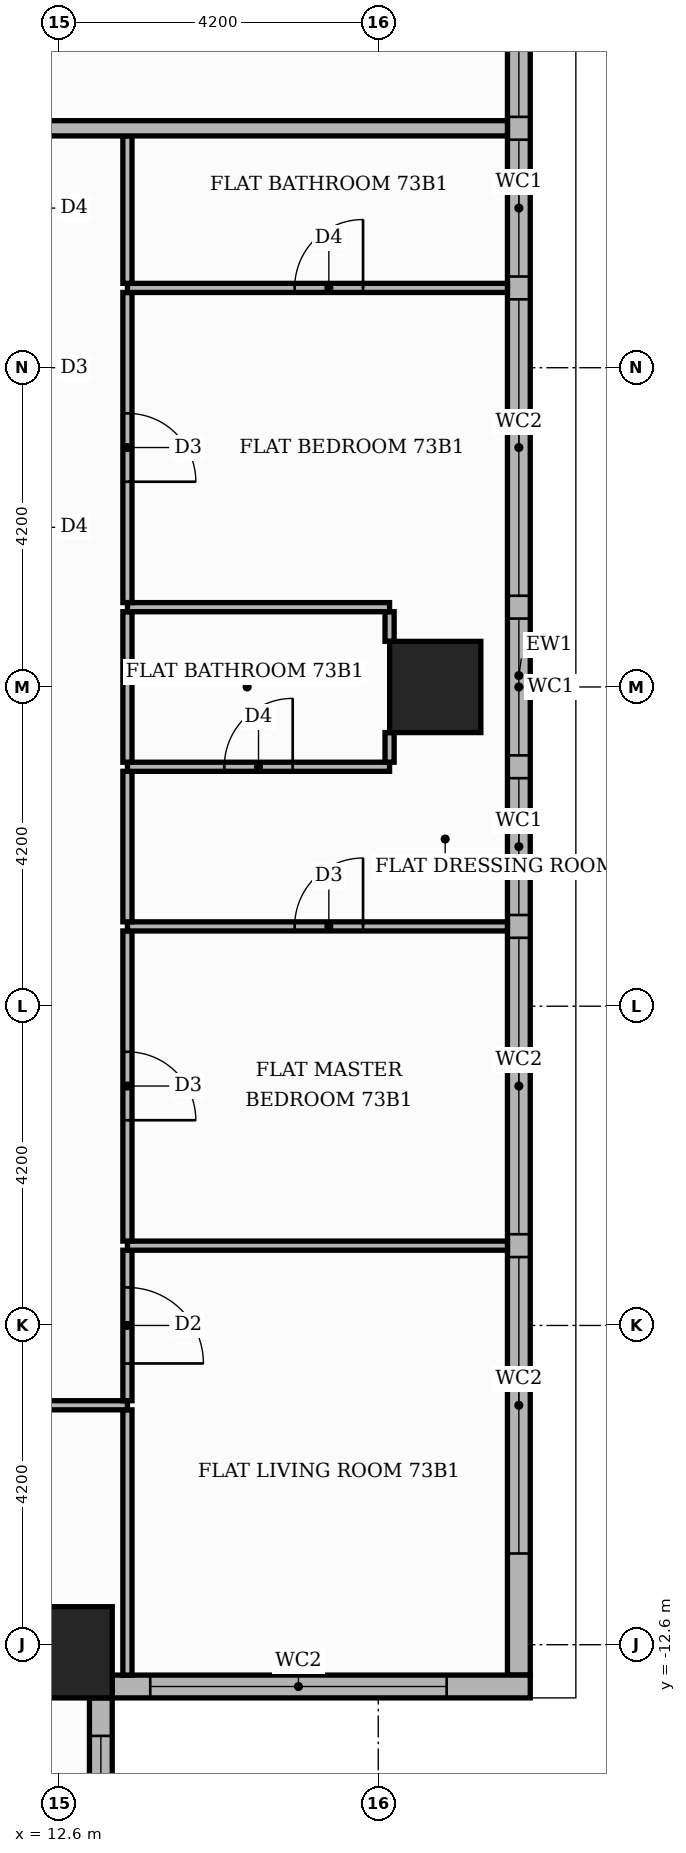
"""IFC4 building model, lengths in metres.
Left out: names, types, materials, properties, quantities, classifications, styles, units other than length and angle.
Written with IfcOpenShell. Run it as: python <this file> out.ifc"""

import sys

from ifc_helpers import new_model, si_unit, direction, frame, frame_2d, origin, origin_2d, place, context, subcontext, project, spatial, rectangle, extrude, element, fill, save


model = new_model("IFC4")
c1 = context("Model", 3, precision=1e-05, world=origin(), true_north=direction((0.0, 1.0)))
c2 = subcontext(c1, "Body", "Model", "MODEL_VIEW")
j1 = project(units=[si_unit("LENGTHUNIT", "METRE"), si_unit("PLANEANGLEUNIT", "RADIAN")], contexts=[c1])
p1 = place(None, origin())
s1 = spatial("IfcSite", under=j1, at=p1, CompositionType="ELEMENT")
p2 = place(p1, origin())
s2 = spatial("IfcBuilding", under=s1, at=p2, CompositionType="ELEMENT")
p3 = place(p2, frame((0.0, 0.0, 304.5)))
s3 = spatial("IfcBuildingStorey", under=s2, at=p3, CompositionType="ELEMENT", Elevation=304.5)
for number, where, z_axis, x_axis in (
    (1, (17.55, 0.0, 0.0), (0.0, 0.0, 1.0), (1.0, 0.0, 0.0)),
    (2, (12.7, -12.7, 0.0), (0.0, 0.0, 1.0), (1.0, 0.0, 0.0)),
):
    element("IfcColumn", number, at=place(p3, frame(where, z_axis=z_axis, x_axis=x_axis)), inside=s3, PredefinedType="COLUMN", context=c2, shape_type="SweptSolid", body=[
        extrude(rectangle(XDim=1.2, YDim=1.2, at=origin_2d()), origin(), (0.0, 0.0, 1.0), 3.9),
    ])
p4 = place(p3, frame((18.65, -13.0, 0.0), z_axis=(0.0, 0.0, 1.0), x_axis=(0.0, 1.0, 0.0)))
e3 = element("IfcWall", 3, at=p4, inside=s3, PredefinedType="STANDARD", context=c2, shape_type="SweptSolid", body=[
    extrude(rectangle(XDim=26.3, YDim=0.3, at=frame_2d((13.15, 0.0))), origin(), (0.0, 0.0, 1.0), 3.55),
])
p5 = place(p4, frame((1.6, 0.0, 0.6)))
e4 = element("IfcOpeningElement", 4, at=p5, cuts=e3, PredefinedType="OPENING", context=c2, shape_type="SweptSolid", body=[
    extrude(rectangle(XDim=3.9, YDim=2.4, at=frame_2d((1.95, 1.2))), frame((0.0, 0.16, 0.0), z_axis=(0.0, -1.0, 0.0), x_axis=(1.0, 0.0, 0.0)), (0.0, 0.0, 1.0), 0.32),
])
p6 = place(p4, frame((5.8, 0.0, 0.6)))
e5 = element("IfcOpeningElement", 5, at=p6, cuts=e3, PredefinedType="OPENING", context=c2, shape_type="SweptSolid", body=[
    extrude(rectangle(XDim=3.9, YDim=2.4, at=frame_2d((1.95, 1.2))), frame((0.0, 0.16, 0.0), z_axis=(0.0, -1.0, 0.0), x_axis=(1.0, 0.0, 0.0)), (0.0, 0.0, 1.0), 0.32),
])
p7 = place(p4, frame((10.0, 0.0, 0.6)))
e6 = element("IfcOpeningElement", 6, at=p7, cuts=e3, PredefinedType="OPENING", context=c2, shape_type="SweptSolid", body=[
    extrude(rectangle(XDim=1.8, YDim=2.4, at=frame_2d((0.9, 1.2))), frame((0.0, 0.16, 0.0), z_axis=(0.0, -1.0, 0.0), x_axis=(1.0, 0.0, 0.0)), (0.0, 0.0, 1.0), 0.32),
])
p8 = place(p4, frame((12.1, 0.0, 0.6)))
e7 = element("IfcOpeningElement", 7, at=p8, cuts=e3, PredefinedType="OPENING", context=c2, shape_type="SweptSolid", body=[
    extrude(rectangle(XDim=1.8, YDim=2.4, at=frame_2d((0.9, 1.2))), frame((0.0, 0.16, 0.0), z_axis=(0.0, -1.0, 0.0), x_axis=(1.0, 0.0, 0.0)), (0.0, 0.0, 1.0), 0.32),
])
p9 = place(p4, frame((14.2, 0.0, 0.6)))
e8 = element("IfcOpeningElement", 8, at=p9, cuts=e3, PredefinedType="OPENING", context=c2, shape_type="SweptSolid", body=[
    extrude(rectangle(XDim=3.9, YDim=2.4, at=frame_2d((1.95, 1.2))), frame((0.0, 0.16, 0.0), z_axis=(0.0, -1.0, 0.0), x_axis=(1.0, 0.0, 0.0)), (0.0, 0.0, 1.0), 0.32),
])
p10 = place(p4, frame((18.4, 0.0, 0.6)))
e9 = element("IfcOpeningElement", 9, at=p10, cuts=e3, PredefinedType="OPENING", context=c2, shape_type="SweptSolid", body=[
    extrude(rectangle(XDim=1.8, YDim=2.4, at=frame_2d((0.9, 1.2))), frame((0.0, 0.16, 0.0), z_axis=(0.0, -1.0, 0.0), x_axis=(1.0, 0.0, 0.0)), (0.0, 0.0, 1.0), 0.32),
])
p11 = place(p4, frame((20.5, 0.0, 0.6)))
e10 = element("IfcOpeningElement", 10, at=p11, cuts=e3, PredefinedType="OPENING", context=c2, shape_type="SweptSolid", body=[
    extrude(rectangle(XDim=3.9, YDim=2.4, at=frame_2d((1.95, 1.2))), frame((0.0, 0.16, 0.0), z_axis=(0.0, -1.0, 0.0), x_axis=(1.0, 0.0, 0.0)), (0.0, 0.0, 1.0), 0.32),
])
p12 = place(p3, frame((13.15, -18.5, 0.0), z_axis=(0.0, 0.0, 1.0), x_axis=(0.0, 1.0, 0.0)))
e11 = element("IfcWall", 11, at=p12, inside=s3, PredefinedType="STANDARD", context=c2, shape_type="SweptSolid", body=[
    extrude(rectangle(XDim=5.2, YDim=0.3, at=frame_2d((2.6, 0.0))), origin(), (0.0, 0.0, 1.0), 3.55),
])
p13 = place(p12, frame((0.8, 0.0, 0.6)))
e12 = element("IfcOpeningElement", 12, at=p13, cuts=e11, PredefinedType="OPENING", context=c2, shape_type="SweptSolid", body=[
    extrude(rectangle(XDim=3.9, YDim=2.4, at=frame_2d((1.95, 1.2))), frame((0.0, 0.16, 0.0), z_axis=(0.0, -1.0, 0.0), x_axis=(1.0, 0.0, 0.0)), (0.0, 0.0, 1.0), 0.32),
])
p14 = place(p3, frame((13.3, -13.15, 0.0), z_axis=(0.0, 0.0, 1.0), x_axis=(1.0, 0.0, 0.0)))
e13 = element("IfcWall", 13, at=p14, inside=s3, PredefinedType="STANDARD", context=c2, shape_type="SweptSolid", body=[
    extrude(rectangle(XDim=5.5, YDim=0.3, at=frame_2d((2.75, 0.0))), origin(), (0.0, 0.0, 1.0), 3.55),
])
p15 = place(p14, frame((0.5, 0.0, 0.6)))
e14 = element("IfcOpeningElement", 14, at=p15, cuts=e13, PredefinedType="OPENING", context=c2, shape_type="SweptSolid", body=[
    extrude(rectangle(XDim=3.9, YDim=2.4, at=frame_2d((1.95, 1.2))), frame((0.0, 0.16, 0.0), z_axis=(0.0, -1.0, 0.0), x_axis=(1.0, 0.0, 0.0)), (0.0, 0.0, 1.0), 0.32),
])
p16 = place(p3, frame((13.5, -13.0, 0.0), z_axis=(0.0, 0.0, 1.0), x_axis=(0.0, 1.0, 0.0)))
e15 = element("IfcWall", 15, at=p16, inside=s3, PredefinedType="PARTITIONING", context=c2, shape_type="SweptSolid", body=[
    extrude(rectangle(XDim=3.49, YDim=0.12, at=frame_2d((1.745, 0.0))), origin(), (0.0, 0.0, 1.0), 3.55),
])
p17 = place(p3, frame((7.45, -9.45, 0.0), z_axis=(0.0, 0.0, 1.0), x_axis=(1.0, 0.0, 0.0)))
e16 = element("IfcWall", 16, at=p17, inside=s3, PredefinedType="PARTITIONING", context=c2, shape_type="SweptSolid", body=[
    extrude(rectangle(XDim=6.05, YDim=0.12, at=frame_2d((3.025, 0.0))), origin(), (0.0, 0.0, 1.0), 3.55),
])
p18 = place(p17, frame((2.475, 0.0, 0.0)))
e17 = element("IfcOpeningElement", 17, at=p18, cuts=e16, PredefinedType="OPENING", context=c2, shape_type="SweptSolid", body=[
    extrude(rectangle(XDim=1.0, YDim=2.1, at=frame_2d((0.5, 1.05))), frame((0.0, 0.07, 0.0), z_axis=(0.0, -1.0, 0.0), x_axis=(1.0, 0.0, 0.0)), (0.0, 0.0, 1.0), 0.14),
])
p19 = place(p3, frame((13.5, -9.39, 0.0), z_axis=(0.0, 0.0, 1.0), x_axis=(0.0, 1.0, 0.0)))
e18 = element("IfcWall", 18, at=p19, inside=s3, PredefinedType="PARTITIONING", context=c2, shape_type="SweptSolid", body=[
    extrude(rectangle(XDim=1.98, YDim=0.12, at=frame_2d((0.99, 0.0))), origin(), (0.0, 0.0, 1.0), 3.55),
])
p20 = place(p19, frame((0.49, 0.0, 0.0)))
e19 = element("IfcOpeningElement", 19, at=p20, cuts=e18, PredefinedType="OPENING", context=c2, shape_type="SweptSolid", body=[
    extrude(rectangle(XDim=1.0, YDim=2.1, at=frame_2d((0.5, 1.05))), frame((0.0, 0.07, 0.0), z_axis=(0.0, -1.0, 0.0), x_axis=(1.0, 0.0, 0.0)), (0.0, 0.0, 1.0), 0.14),
])
p21 = place(p3, frame((13.5, -7.35, 0.0), z_axis=(0.0, 0.0, 1.0), x_axis=(1.0, 0.0, 0.0)))
e20 = element("IfcWall", 20, at=p21, inside=s3, PredefinedType="PARTITIONING", context=c2, shape_type="SweptSolid", body=[
    extrude(rectangle(XDim=5.0, YDim=0.12, at=frame_2d((2.5, 0.0))), origin(), (0.0, 0.0, 1.0), 3.55),
])
p22 = place(p3, frame((13.5, -7.29, 0.0), z_axis=(0.0, 0.0, 1.0), x_axis=(0.0, 1.0, 0.0)))
e21 = element("IfcWall", 21, at=p22, inside=s3, PredefinedType="PARTITIONING", context=c2, shape_type="SweptSolid", body=[
    extrude(rectangle(XDim=4.08, YDim=0.12, at=frame_2d((2.04, 0.0))), origin(), (0.0, 0.0, 1.0), 3.55),
])
p23 = place(p22, frame((1.59, 0.0, 0.0)))
e22 = element("IfcOpeningElement", 22, at=p23, cuts=e21, PredefinedType="OPENING", context=c2, shape_type="SweptSolid", body=[
    extrude(rectangle(XDim=0.9, YDim=2.1, at=frame_2d((0.45, 1.05))), frame((0.0, 0.07, 0.0), z_axis=(0.0, -1.0, 0.0), x_axis=(1.0, 0.0, 0.0)), (0.0, 0.0, 1.0), 0.14),
])
p24 = place(p3, frame((13.5, -3.15, 0.0), z_axis=(0.0, 0.0, 1.0), x_axis=(1.0, 0.0, 0.0)))
e23 = element("IfcWall", 23, at=p24, inside=s3, PredefinedType="PARTITIONING", context=c2, shape_type="SweptSolid", body=[
    extrude(rectangle(XDim=5.0, YDim=0.12, at=frame_2d((2.5, 0.0))), origin(), (0.0, 0.0, 1.0), 3.55),
])
p25 = place(p24, frame((2.2, 0.0, 0.0)))
e24 = element("IfcOpeningElement", 24, at=p25, cuts=e23, PredefinedType="OPENING", context=c2, shape_type="SweptSolid", body=[
    extrude(rectangle(XDim=0.9, YDim=2.1, at=frame_2d((0.45, 1.05))), frame((0.0, 0.07, 0.0), z_axis=(0.0, -1.0, 0.0), x_axis=(1.0, 0.0, 0.0)), (0.0, 0.0, 1.0), 0.14),
])
p26 = place(p3, frame((13.5, -3.09, 0.0), z_axis=(0.0, 0.0, 1.0), x_axis=(0.0, 1.0, 0.0)))
e25 = element("IfcWall", 25, at=p26, inside=s3, PredefinedType="PARTITIONING", context=c2, shape_type="SweptSolid", body=[
    extrude(rectangle(XDim=1.98, YDim=0.12, at=frame_2d((0.99, 0.0))), origin(), (0.0, 0.0, 1.0), 3.55),
])
p27 = place(p3, frame((13.5, -1.05, 0.0), z_axis=(0.0, 0.0, 1.0), x_axis=(1.0, 0.0, 0.0)))
e26 = element("IfcWall", 26, at=p27, inside=s3, PredefinedType="PARTITIONING", context=c2, shape_type="SweptSolid", body=[
    extrude(rectangle(XDim=3.449, YDim=0.12, at=frame_2d((1.725, 0.0))), origin(), (0.0, 0.0, 1.0), 3.55),
])
p28 = place(p27, frame((1.274, 0.0, 0.0)))
e27 = element("IfcOpeningElement", 27, at=p28, cuts=e26, PredefinedType="OPENING", context=c2, shape_type="SweptSolid", body=[
    extrude(rectangle(XDim=0.9, YDim=2.1, at=frame_2d((0.45, 1.05))), frame((0.0, 0.07, 0.0), z_axis=(0.0, -1.0, 0.0), x_axis=(1.0, 0.0, 0.0)), (0.0, 0.0, 1.0), 0.14),
])
p29 = place(p3, frame((13.5, -0.99, 0.0), z_axis=(0.0, 0.0, 1.0), x_axis=(0.0, 1.0, 0.0)))
e28 = element("IfcWall", 28, at=p29, inside=s3, PredefinedType="PARTITIONING", context=c2, shape_type="SweptSolid", body=[
    extrude(rectangle(XDim=1.98, YDim=0.12, at=frame_2d((0.99, 0.0))), origin(), (0.0, 0.0, 1.0), 3.55),
])
for number, where, z_axis, x_axis in (
    (29, (16.949, -0.99, 0.0), (0.0, 0.0, 1.0), (0.0, 1.0, 0.0)),
    (30, (16.949, 0.6, 0.0), (0.0, 0.0, 1.0), (0.0, 1.0, 0.0)),
):
    element("IfcWall", number, at=place(p3, frame(where, z_axis=z_axis, x_axis=x_axis)), inside=s3, PredefinedType="PARTITIONING", context=c2, shape_type="SweptSolid", body=[
        extrude(rectangle(XDim=0.39, YDim=0.12, at=frame_2d((0.195, 0.0))), origin(), (0.0, 0.0, 1.0), 3.55),
    ])
p30 = place(p3, frame((13.5, 1.05, 0.0), z_axis=(0.0, 0.0, 1.0), x_axis=(1.0, 0.0, 0.0)))
e31 = element("IfcWall", 31, at=p30, inside=s3, PredefinedType="PARTITIONING", context=c2, shape_type="SweptSolid", body=[
    extrude(rectangle(XDim=3.449, YDim=0.12, at=frame_2d((1.725, 0.0))), origin(), (0.0, 0.0, 1.0), 3.55),
])
p31 = place(p3, frame((13.5, 1.11, 0.0), z_axis=(0.0, 0.0, 1.0), x_axis=(0.0, 1.0, 0.0)))
e32 = element("IfcWall", 32, at=p31, inside=s3, PredefinedType="PARTITIONING", context=c2, shape_type="SweptSolid", body=[
    extrude(rectangle(XDim=4.08, YDim=0.12, at=frame_2d((2.04, 0.0))), origin(), (0.0, 0.0, 1.0), 3.55),
])
p32 = place(p31, frame((1.59, 0.0, 0.0)))
e33 = element("IfcOpeningElement", 33, at=p32, cuts=e32, PredefinedType="OPENING", context=c2, shape_type="SweptSolid", body=[
    extrude(rectangle(XDim=0.9, YDim=2.1, at=frame_2d((0.45, 1.05))), frame((0.0, 0.07, 0.0), z_axis=(0.0, -1.0, 0.0), x_axis=(1.0, 0.0, 0.0)), (0.0, 0.0, 1.0), 0.14),
])
p33 = place(p3, frame((13.5, 5.25, 0.0), z_axis=(0.0, 0.0, 1.0), x_axis=(1.0, 0.0, 0.0)))
e34 = element("IfcWall", 34, at=p33, inside=s3, PredefinedType="PARTITIONING", context=c2, shape_type="SweptSolid", body=[
    extrude(rectangle(XDim=5.0, YDim=0.12, at=frame_2d((2.5, 0.0))), origin(), (0.0, 0.0, 1.0), 3.55),
])
p34 = place(p33, frame((2.2, 0.0, 0.0)))
e35 = element("IfcOpeningElement", 35, at=p34, cuts=e34, PredefinedType="OPENING", context=c2, shape_type="SweptSolid", body=[
    extrude(rectangle(XDim=0.9, YDim=2.1, at=frame_2d((0.45, 1.05))), frame((0.0, 0.07, 0.0), z_axis=(0.0, -1.0, 0.0), x_axis=(1.0, 0.0, 0.0)), (0.0, 0.0, 1.0), 0.14),
])
p35 = place(p3, frame((13.5, 5.31, 0.0), z_axis=(0.0, 0.0, 1.0), x_axis=(0.0, 1.0, 0.0)))
e36 = element("IfcWall", 36, at=p35, inside=s3, PredefinedType="PARTITIONING", context=c2, shape_type="SweptSolid", body=[
    extrude(rectangle(XDim=1.94, YDim=0.12, at=frame_2d((0.97, 0.0))), origin(), (0.0, 0.0, 1.0), 3.55),
])
p36 = place(p3, frame((1.3, 7.35, 0.0), z_axis=(0.0, 0.0, 1.0), x_axis=(1.0, 0.0, 0.0)))
e37 = element("IfcWall", 37, at=p36, inside=s3, PredefinedType="PARTITIONING", context=c2, shape_type="SweptSolid", body=[
    extrude(rectangle(XDim=17.2, YDim=0.2, at=frame_2d((8.6, 0.0))), origin(), (0.0, 0.0, 1.0), 3.55),
])
p37 = place(p36, frame((2.475, 0.0, 0.0)))
e38 = element("IfcOpeningElement", 38, at=p37, cuts=e37, PredefinedType="OPENING", context=c2, shape_type="SweptSolid", body=[
    extrude(rectangle(XDim=1.1, YDim=2.4, at=frame_2d((0.55, 1.2))), frame((0.0, 0.11, 0.0), z_axis=(0.0, -1.0, 0.0), x_axis=(1.0, 0.0, 0.0)), (0.0, 0.0, 1.0), 0.22),
])
p38 = place(p5, origin())
e39 = element("IfcWindow", 39, at=p38, inside=s3, PartitioningType="SINGLE_PANEL", PredefinedType="WINDOW", context=c2, shape_type="SweptSolid", body=[
    extrude(rectangle(XDim=3.9, YDim=2.4, at=frame_2d((1.95, 1.2))), frame((0.0, 0.03, 0.0), z_axis=(0.0, -1.0, 0.0), x_axis=(1.0, 0.0, 0.0)), (0.0, 0.0, 1.0), 0.06),
])
fill(e4, e39)
p39 = place(p6, origin())
e40 = element("IfcWindow", 40, at=p39, inside=s3, PartitioningType="SINGLE_PANEL", PredefinedType="WINDOW", context=c2, shape_type="SweptSolid", body=[
    extrude(rectangle(XDim=3.9, YDim=2.4, at=frame_2d((1.95, 1.2))), frame((0.0, 0.03, 0.0), z_axis=(0.0, -1.0, 0.0), x_axis=(1.0, 0.0, 0.0)), (0.0, 0.0, 1.0), 0.06),
])
fill(e5, e40)
p40 = place(p7, origin())
e41 = element("IfcWindow", 41, at=p40, inside=s3, PartitioningType="SINGLE_PANEL", PredefinedType="WINDOW", context=c2, shape_type="SweptSolid", body=[
    extrude(rectangle(XDim=1.8, YDim=2.4, at=frame_2d((0.9, 1.2))), frame((0.0, 0.03, 0.0), z_axis=(0.0, -1.0, 0.0), x_axis=(1.0, 0.0, 0.0)), (0.0, 0.0, 1.0), 0.06),
])
fill(e6, e41)
p41 = place(p8, origin())
e42 = element("IfcWindow", 42, at=p41, inside=s3, PartitioningType="SINGLE_PANEL", PredefinedType="WINDOW", context=c2, shape_type="SweptSolid", body=[
    extrude(rectangle(XDim=1.8, YDim=2.4, at=frame_2d((0.9, 1.2))), frame((0.0, 0.03, 0.0), z_axis=(0.0, -1.0, 0.0), x_axis=(1.0, 0.0, 0.0)), (0.0, 0.0, 1.0), 0.06),
])
fill(e7, e42)
p42 = place(p9, origin())
e43 = element("IfcWindow", 43, at=p42, inside=s3, PartitioningType="SINGLE_PANEL", PredefinedType="WINDOW", context=c2, shape_type="SweptSolid", body=[
    extrude(rectangle(XDim=3.9, YDim=2.4, at=frame_2d((1.95, 1.2))), frame((0.0, 0.03, 0.0), z_axis=(0.0, -1.0, 0.0), x_axis=(1.0, 0.0, 0.0)), (0.0, 0.0, 1.0), 0.06),
])
fill(e8, e43)
p43 = place(p10, origin())
e44 = element("IfcWindow", 44, at=p43, inside=s3, PartitioningType="SINGLE_PANEL", PredefinedType="WINDOW", context=c2, shape_type="SweptSolid", body=[
    extrude(rectangle(XDim=1.8, YDim=2.4, at=frame_2d((0.9, 1.2))), frame((0.0, 0.03, 0.0), z_axis=(0.0, -1.0, 0.0), x_axis=(1.0, 0.0, 0.0)), (0.0, 0.0, 1.0), 0.06),
])
fill(e9, e44)
p44 = place(p11, origin())
e45 = element("IfcWindow", 45, at=p44, inside=s3, PartitioningType="SINGLE_PANEL", PredefinedType="WINDOW", context=c2, shape_type="SweptSolid", body=[
    extrude(rectangle(XDim=3.9, YDim=2.4, at=frame_2d((1.95, 1.2))), frame((0.0, 0.03, 0.0), z_axis=(0.0, -1.0, 0.0), x_axis=(1.0, 0.0, 0.0)), (0.0, 0.0, 1.0), 0.06),
])
fill(e10, e45)
p45 = place(p13, origin())
e46 = element("IfcWindow", 46, at=p45, inside=s3, PartitioningType="SINGLE_PANEL", PredefinedType="WINDOW", context=c2, shape_type="SweptSolid", body=[
    extrude(rectangle(XDim=3.9, YDim=2.4, at=frame_2d((1.95, 1.2))), frame((0.0, 0.03, 0.0), z_axis=(0.0, -1.0, 0.0), x_axis=(1.0, 0.0, 0.0)), (0.0, 0.0, 1.0), 0.06),
])
fill(e12, e46)
p46 = place(p15, origin())
e47 = element("IfcWindow", 47, at=p46, inside=s3, PartitioningType="SINGLE_PANEL", PredefinedType="WINDOW", context=c2, shape_type="SweptSolid", body=[
    extrude(rectangle(XDim=3.9, YDim=2.4, at=frame_2d((1.95, 1.2))), frame((0.0, 0.03, 0.0), z_axis=(0.0, -1.0, 0.0), x_axis=(1.0, 0.0, 0.0)), (0.0, 0.0, 1.0), 0.06),
])
fill(e14, e47)
p47 = place(p20, frame((1.0, 0.0, 0.0), z_axis=(0.0, 0.0, 1.0), x_axis=(-1.0, 0.0, 0.0)))
e48 = element("IfcDoor", 48, at=p47, inside=s3, OperationType="SINGLE_SWING_LEFT", PredefinedType="DOOR", context=c2, shape_type="SweptSolid", body=[
    extrude(rectangle(XDim=1.0, YDim=2.1, at=frame_2d((0.5, 1.05))), frame((0.0, 0.025, 0.0), z_axis=(0.0, -1.0, 0.0), x_axis=(1.0, 0.0, 0.0)), (0.0, 0.0, 1.0), 0.05),
])
fill(e19, e48)
p48 = place(p23, frame((0.9, 0.0, 0.0), z_axis=(0.0, 0.0, 1.0), x_axis=(-1.0, 0.0, 0.0)))
e49 = element("IfcDoor", 49, at=p48, inside=s3, OperationType="SINGLE_SWING_LEFT", PredefinedType="DOOR", context=c2, shape_type="SweptSolid", body=[
    extrude(rectangle(XDim=0.9, YDim=2.1, at=frame_2d((0.45, 1.05))), frame((0.0, 0.025, 0.0), z_axis=(0.0, -1.0, 0.0), x_axis=(1.0, 0.0, 0.0)), (0.0, 0.0, 1.0), 0.05),
])
fill(e22, e49)
p49 = place(p25, origin())
e50 = element("IfcDoor", 50, at=p49, inside=s3, OperationType="SINGLE_SWING_RIGHT", PredefinedType="DOOR", context=c2, shape_type="SweptSolid", body=[
    extrude(rectangle(XDim=0.9, YDim=2.1, at=frame_2d((0.45, 1.05))), frame((0.0, 0.025, 0.0), z_axis=(0.0, -1.0, 0.0), x_axis=(1.0, 0.0, 0.0)), (0.0, 0.0, 1.0), 0.05),
])
fill(e24, e50)
p50 = place(p28, origin())
e51 = element("IfcDoor", 51, at=p50, inside=s3, OperationType="SINGLE_SWING_RIGHT", PredefinedType="DOOR", context=c2, shape_type="SweptSolid", body=[
    extrude(rectangle(XDim=0.9, YDim=2.1, at=frame_2d((0.45, 1.05))), frame((0.0, 0.025, 0.0), z_axis=(0.0, -1.0, 0.0), x_axis=(1.0, 0.0, 0.0)), (0.0, 0.0, 1.0), 0.05),
])
fill(e27, e51)
p51 = place(p32, frame((0.9, 0.0, 0.0), z_axis=(0.0, 0.0, 1.0), x_axis=(-1.0, 0.0, 0.0)))
e52 = element("IfcDoor", 52, at=p51, inside=s3, OperationType="SINGLE_SWING_LEFT", PredefinedType="DOOR", context=c2, shape_type="SweptSolid", body=[
    extrude(rectangle(XDim=0.9, YDim=2.1, at=frame_2d((0.45, 1.05))), frame((0.0, 0.025, 0.0), z_axis=(0.0, -1.0, 0.0), x_axis=(1.0, 0.0, 0.0)), (0.0, 0.0, 1.0), 0.05),
])
fill(e33, e52)
p52 = place(p34, origin())
e53 = element("IfcDoor", 53, at=p52, inside=s3, OperationType="SINGLE_SWING_RIGHT", PredefinedType="DOOR", context=c2, shape_type="SweptSolid", body=[
    extrude(rectangle(XDim=0.9, YDim=2.1, at=frame_2d((0.45, 1.05))), frame((0.0, 0.025, 0.0), z_axis=(0.0, -1.0, 0.0), x_axis=(1.0, 0.0, 0.0)), (0.0, 0.0, 1.0), 0.05),
])
fill(e35, e53)
save(model, sys.argv[1])
